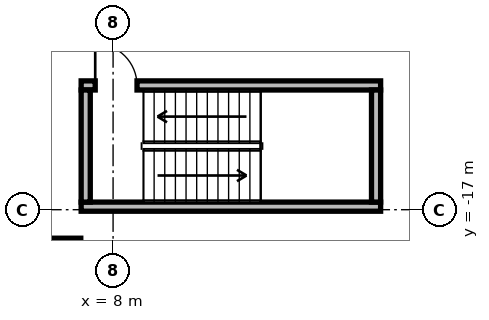
"""IFC4 building model, lengths in metres.
Left out: names, types, materials, properties, quantities, classifications, styles, units other than length and angle.
Written with IfcOpenShell. Run it as: python <this file> out.ifc"""

import sys

from ifc_helpers import new_model, si_unit, direction, frame, frame_2d, origin, origin_2d, place, context, subcontext, project, spatial, rectangle, extrude, source, transform, mapped, element, fill, save


model = new_model("IFC4")
c1 = context("Model", 3, precision=1e-05, world=origin(), true_north=direction((0.0, 1.0)))
c2 = subcontext(c1, "Body", "Model", "MODEL_VIEW")
j1 = project(units=[si_unit("LENGTHUNIT", "METRE"), si_unit("PLANEANGLEUNIT", "RADIAN")], contexts=[c1])
p1 = place(None, origin())
s1 = spatial("IfcSite", under=j1, at=p1, CompositionType="ELEMENT")
p2 = place(p1, origin())
s2 = spatial("IfcBuilding", under=s1, at=p2, CompositionType="ELEMENT")
p3 = place(p2, frame((0.0, 0.0, -8.4)))
s3 = spatial("IfcBuildingStorey", under=s2, at=p3, CompositionType="ELEMENT", Elevation=-8.4)
m1 = source(origin(), c2, "Body", "SweptSolid", [
    extrude(rectangle(XDim=1.3, YDim=1.3, at=origin_2d()), origin(), (0.0, 0.0, 1.0), 4.2),
])
p4 = place(p3, frame((6.5, -18.4, 0.0), z_axis=(0.0, 0.0, 1.0), x_axis=(1.0, 0.0, 0.0)))
e1 = element("IfcColumn", 1, at=p4, inside=s3, PredefinedType="COLUMN", context=c2, shape_type="MappedRepresentation", body=[
    mapped(m1, transform((0.0, 0.0, 0.0), x_axis=(1.0, 0.0, 0.0), y_axis=(0.0, 1.0, 0.0), z_axis=(0.0, 0.0, 1.0), scale=1.0)),
])
m2 = source(origin(), c2, "Body", "SweptSolid", [
    extrude(rectangle(XDim=7.88, YDim=0.24, at=frame_2d((3.94, 0.0))), origin(), (0.0, 0.0, 1.0), 3.88),
])
p5 = place(p3, frame((7.16, -13.73, 0.0), z_axis=(0.0, 0.0, 1.0), x_axis=(1.0, 0.0, 0.0)))
e2 = element("IfcWall", 2, at=p5, inside=s3, PredefinedType="PARTITIONING", context=c2, shape_type="MappedRepresentation", body=[
    mapped(m2, transform((0.0, 0.0, 0.0), x_axis=(1.0, 0.0, 0.0), y_axis=(0.0, 1.0, 0.0), z_axis=(0.0, 0.0, 1.0), scale=1.0)),
])
p6 = place(p5, frame((0.37, 0.0, 0.0)))
e3 = element("IfcOpeningElement", 3, at=p6, cuts=e2, PredefinedType="OPENING", context=c2, shape_type="SweptSolid", body=[
    extrude(rectangle(XDim=1.1, YDim=2.15, at=frame_2d((0.55, 1.075))), frame((0.0, 0.13, 0.0), z_axis=(0.0, -1.0, 0.0), x_axis=(1.0, 0.0, 0.0)), (0.0, 0.0, 1.0), 0.26),
])
p7 = place(p3, frame((7.16, -16.92, 0.0), z_axis=(0.0, 0.0, 1.0), x_axis=(1.0, 0.0, 0.0)))
e4 = element("IfcWall", 4, at=p7, inside=s3, PredefinedType="PARTITIONING", context=c2, shape_type="MappedRepresentation", body=[
    mapped(m2, transform((0.0, 0.0, 0.0), x_axis=(1.0, 0.0, 0.0), y_axis=(0.0, 1.0, 0.0), z_axis=(0.0, 0.0, 1.0), scale=1.0)),
])
m3 = source(origin(), c2, "Body", "SweptSolid", [
    extrude(rectangle(XDim=2.95, YDim=0.24, at=frame_2d((1.475, 0.0))), origin(), (0.0, 0.0, 1.0), 3.88),
])
for number, where, z_axis, x_axis in (
    (5, (7.28, -16.8, 0.0), (0.0, 0.0, 1.0), (0.0, 1.0, 0.0)),
    (6, (14.92, -16.8, 0.0), (0.0, 0.0, 1.0), (0.0, 1.0, 0.0)),
):
    element("IfcWall", number, at=place(p3, frame(where, z_axis=z_axis, x_axis=x_axis)), inside=s3, PredefinedType="PARTITIONING", context=c2, shape_type="MappedRepresentation", body=[
        mapped(m3, transform((0.0, 0.0, 0.0), x_axis=(1.0, 0.0, 0.0), y_axis=(0.0, 1.0, 0.0), z_axis=(0.0, 0.0, 1.0), scale=1.0)),
    ])
m4 = source(origin(), c2, "Body", "SweptSolid", [
    extrude(rectangle(XDim=1.1, YDim=2.15, at=frame_2d((0.55, 1.075))), frame((0.0, 0.025, 0.0), z_axis=(0.0, -1.0, 0.0), x_axis=(1.0, 0.0, 0.0)), (0.0, 0.0, 1.0), 0.05),
])
p8 = place(p6, origin())
e7 = element("IfcDoor", 7, at=p8, inside=s3, OperationType="SINGLE_SWING_LEFT", PredefinedType="DOOR", context=c2, shape_type="MappedRepresentation", body=[
    mapped(m4, transform((0.0, 0.0, 0.0), x_axis=(1.0, 0.0, 0.0), y_axis=(0.0, 1.0, 0.0), z_axis=(0.0, 0.0, 1.0), scale=1.0)),
])
fill(e3, e7)
save(model, sys.argv[1])
